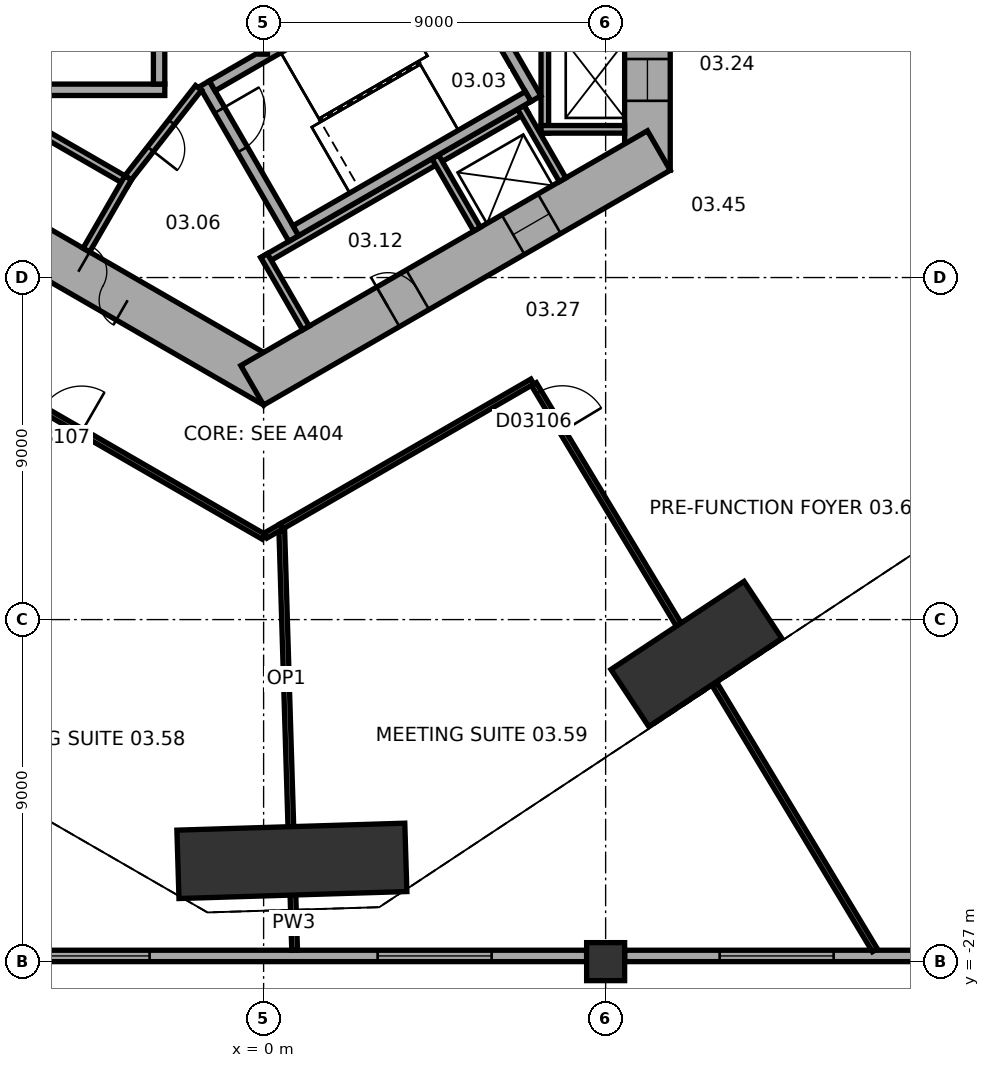
"""IFC4 building model, lengths in metres.
Left out: names, types, materials, properties, quantities, classifications, styles, units other than length and angle.
Written with IfcOpenShell. Run it as: python <this file> out.ifc"""

import sys

from ifc_helpers import new_model, si_unit, direction, frame, frame_2d, origin, origin_2d, place, context, subcontext, project, spatial, rectangle, extrude, element, fill, save


model = new_model("IFC4")
c1 = context("Model", 3, precision=1e-05, world=origin(), true_north=direction((0.0, 1.0)))
c2 = subcontext(c1, "Body", "Model", "MODEL_VIEW")
j1 = project(units=[si_unit("LENGTHUNIT", "METRE"), si_unit("PLANEANGLEUNIT", "RADIAN")], contexts=[c1])
p1 = place(None, origin())
s1 = spatial("IfcSite", under=j1, at=p1, CompositionType="ELEMENT")
p2 = place(p1, origin())
s2 = spatial("IfcBuilding", under=s1, at=p2, CompositionType="ELEMENT")
p3 = place(p2, frame((0.0, 0.0, 21.0)))
s3 = spatial("IfcBuildingStorey", under=s2, at=p3, CompositionType="ELEMENT", Elevation=21.0)
p4 = place(p3, frame((0.744, -24.348, 0.0), z_axis=(0.0, 0.0, 1.0), x_axis=(0.999533484231, 0.03054200224, 0.0)))
e1 = element("IfcColumn", 1, at=p4, inside=s3, PredefinedType="COLUMN", context=c2, shape_type="SweptSolid", body=[
    extrude(rectangle(XDim=6.0, YDim=1.8, at=origin_2d()), origin(), (0.0, 0.0, 1.0), 8.0),
])
p5 = place(p3, frame((11.389, -18.905, 0.0), z_axis=(0.0, 0.0, 1.0), x_axis=(0.833880042151, 0.551945717714, 0.0)))
e2 = element("IfcColumn", 2, at=p5, inside=s3, PredefinedType="COLUMN", context=c2, shape_type="SweptSolid", body=[
    extrude(rectangle(XDim=4.2, YDim=1.8, at=origin_2d()), origin(), (0.0, 0.0, 1.0), 8.0),
])
p6 = place(p3, frame((9.0, -27.0, 0.0), z_axis=(0.0, 0.0, 1.0), x_axis=(1.0, 0.0, 0.0)))
e3 = element("IfcColumn", 3, at=p6, inside=s3, PredefinedType="COLUMN", context=c2, shape_type="SweptSolid", body=[
    extrude(rectangle(XDim=1.0, YDim=1.0, at=origin_2d()), origin(), (0.0, 0.0, 1.0), 8.0),
])
p7 = place(p3, frame((10.1, -6.177, 0.0), z_axis=(0.0, 0.0, 1.0), x_axis=(0.0, 1.0, 0.0)))
e4 = element("IfcWall", 4, at=p7, inside=s3, PredefinedType="SHEAR", context=c2, shape_type="SweptSolid", body=[
    extrude(rectangle(XDim=12.355, YDim=1.2, at=frame_2d((6.177, 0.0))), origin(), (0.0, 0.0, 1.0), 8.0),
])
p8 = place(p7, frame((6.378, 0.0, 0.0)))
e5 = element("IfcOpeningElement", 5, at=p8, cuts=e4, PredefinedType="OPENING", context=c2, shape_type="SweptSolid", body=[
    extrude(rectangle(XDim=1.5, YDim=2.1, at=frame_2d((0.75, 1.05))), frame((0.0, 0.61, 0.0), z_axis=(0.0, -1.0, 0.0), x_axis=(1.0, 0.0, 0.0)), (0.0, 0.0, 1.0), 1.22),
])
p9 = place(p7, frame((1.828, 0.0, 0.0)))
e6 = element("IfcOpeningElement", 6, at=p9, cuts=e4, PredefinedType="OPENING", context=c2, shape_type="SweptSolid", body=[
    extrude(rectangle(XDim=1.1, YDim=2.1, at=frame_2d((0.55, 1.05))), frame((0.0, 0.61, 0.0), z_axis=(0.0, -1.0, 0.0), x_axis=(1.0, 0.0, 0.0)), (0.0, 0.0, 1.0), 1.22),
])
p10 = place(p7, frame((4.427, 0.0, 0.0)))
e7 = element("IfcOpeningElement", 7, at=p10, cuts=e4, PredefinedType="OPENING", context=c2, shape_type="SweptSolid", body=[
    extrude(rectangle(XDim=1.1, YDim=2.1, at=frame_2d((0.55, 1.05))), frame((0.0, 0.61, 0.0), z_axis=(0.0, -1.0, 0.0), x_axis=(1.0, 0.0, 0.0)), (0.0, 0.0, 1.0), 1.22),
])
p11 = place(p3, frame((-10.4, -5.658, 0.0), z_axis=(0.0, 0.0, 1.0), x_axis=(0.866021384402, -0.500006961711, 0.0)))
e8 = element("IfcWall", 8, at=p11, inside=s3, PredefinedType="SHEAR", context=c2, shape_type="SweptSolid", body=[
    extrude(rectangle(XDim=12.355, YDim=1.2, at=frame_2d((6.178, 0.0))), origin(), (0.0, 0.0, 1.0), 8.0),
])
p12 = place(p11, frame((6.378, 0.0, 0.0)))
e9 = element("IfcOpeningElement", 9, at=p12, cuts=e8, PredefinedType="OPENING", context=c2, shape_type="SweptSolid", body=[
    extrude(rectangle(XDim=1.5, YDim=2.1, at=frame_2d((0.75, 1.05))), frame((0.0, 0.61, 0.0), z_axis=(0.0, -1.0, 0.0), x_axis=(1.0, 0.0, 0.0)), (0.0, 0.0, 1.0), 1.22),
])
p13 = place(p11, frame((3.228, 0.0, 0.0)))
e10 = element("IfcOpeningElement", 10, at=p13, cuts=e8, PredefinedType="OPENING", context=c2, shape_type="SweptSolid", body=[
    extrude(rectangle(XDim=0.9, YDim=2.1, at=frame_2d((0.45, 1.05))), frame((0.0, 0.61, 0.0), z_axis=(0.0, -1.0, 0.0), x_axis=(1.0, 0.0, 0.0)), (0.0, 0.0, 1.0), 1.22),
])
p14 = place(p3, frame((-0.3, -11.836, 0.0), z_axis=(0.0, 0.0, 1.0), x_axis=(0.866021384402, 0.500006961711, 0.0)))
e11 = element("IfcWall", 11, at=p14, inside=s3, PredefinedType="SHEAR", context=c2, shape_type="SweptSolid", body=[
    extrude(rectangle(XDim=12.355, YDim=1.2, at=frame_2d((6.178, 0.0))), origin(), (0.0, 0.0, 1.0), 8.0),
])
p15 = place(p14, frame((4.128, 0.0, 0.0)))
e12 = element("IfcOpeningElement", 12, at=p15, cuts=e11, PredefinedType="OPENING", context=c2, shape_type="SweptSolid", body=[
    extrude(rectangle(XDim=0.9, YDim=2.1, at=frame_2d((0.45, 1.05))), frame((0.0, 0.61, 0.0), z_axis=(0.0, -1.0, 0.0), x_axis=(1.0, 0.0, 0.0)), (0.0, 0.0, 1.0), 1.22),
])
p16 = place(p14, frame((7.928, 0.0, 0.0)))
e13 = element("IfcOpeningElement", 13, at=p16, cuts=e11, PredefinedType="OPENING", context=c2, shape_type="SweptSolid", body=[
    extrude(rectangle(XDim=1.1, YDim=2.1, at=frame_2d((0.55, 1.05))), frame((0.0, 0.61, 0.0), z_axis=(0.0, -1.0, 0.0), x_axis=(1.0, 0.0, 0.0)), (0.0, 0.0, 1.0), 1.22),
])
p17 = place(p3, frame((-8.5, -26.85, 0.0), z_axis=(0.0, 0.0, 1.0), x_axis=(1.0, 0.0, 0.0)))
e14 = element("IfcWall", 14, at=p17, inside=s3, PredefinedType="STANDARD", context=c2, shape_type="SweptSolid", body=[
    extrude(rectangle(XDim=17.0, YDim=0.3, at=frame_2d((8.5, 0.0))), origin(), (0.0, 0.0, 1.0), 6.5),
])
p18 = place(p17, frame((2.5, 0.0, 1.0)))
e15 = element("IfcOpeningElement", 15, at=p18, cuts=e14, PredefinedType="OPENING", context=c2, shape_type="SweptSolid", body=[
    extrude(rectangle(XDim=3.0, YDim=4.0, at=frame_2d((1.5, 2.0))), frame((0.0, 0.16, 0.0), z_axis=(0.0, -1.0, 0.0), x_axis=(1.0, 0.0, 0.0)), (0.0, 0.0, 1.0), 0.32),
])
p19 = place(p17, frame((11.5, 0.0, 1.0)))
e16 = element("IfcOpeningElement", 16, at=p19, cuts=e14, PredefinedType="OPENING", context=c2, shape_type="SweptSolid", body=[
    extrude(rectangle(XDim=3.0, YDim=4.0, at=frame_2d((1.5, 2.0))), frame((0.0, 0.16, 0.0), z_axis=(0.0, -1.0, 0.0), x_axis=(1.0, 0.0, 0.0)), (0.0, 0.0, 1.0), 0.32),
])
p20 = place(p3, frame((9.5, -26.85, 0.0), z_axis=(0.0, 0.0, 1.0), x_axis=(1.0, 0.0, 0.0)))
e17 = element("IfcWall", 17, at=p20, inside=s3, PredefinedType="STANDARD", context=c2, shape_type="SweptSolid", body=[
    extrude(rectangle(XDim=17.0, YDim=0.3, at=frame_2d((8.5, 0.0))), origin(), (0.0, 0.0, 1.0), 6.5),
])
p21 = place(p20, frame((2.5, 0.0, 1.0)))
e18 = element("IfcOpeningElement", 18, at=p21, cuts=e17, PredefinedType="OPENING", context=c2, shape_type="SweptSolid", body=[
    extrude(rectangle(XDim=3.0, YDim=4.0, at=frame_2d((1.5, 2.0))), frame((0.0, 0.16, 0.0), z_axis=(0.0, -1.0, 0.0), x_axis=(1.0, 0.0, 0.0)), (0.0, 0.0, 1.0), 0.32),
])
p22 = place(p20, frame((11.5, 0.0, 1.0)))
e19 = element("IfcOpeningElement", 19, at=p22, cuts=e17, PredefinedType="OPENING", context=c2, shape_type="SweptSolid", body=[
    extrude(rectangle(XDim=3.0, YDim=4.0, at=frame_2d((1.5, 2.0))), frame((0.0, 0.16, 0.0), z_axis=(0.0, -1.0, 0.0), x_axis=(1.0, 0.0, 0.0)), (0.0, 0.0, 1.0), 0.32),
])
p23 = place(p3, frame((7.4, -5.2, 0.0), z_axis=(0.0, 0.0, 1.0), x_axis=(0.0, 1.0, 0.0)))
e20 = element("IfcWall", 20, at=p23, inside=s3, PredefinedType="PARTITIONING", context=c2, shape_type="SweptSolid", body=[
    extrude(rectangle(XDim=5.4, YDim=0.2, at=frame_2d((2.7, 0.0))), origin(), (0.0, 0.0, 1.0), 7.7),
])
p24 = place(p3, frame((7.3, -5.1, 0.0), z_axis=(0.0, 0.0, 1.0), x_axis=(1.0, 0.0, 0.0)))
e21 = element("IfcWall", 21, at=p24, inside=s3, PredefinedType="PARTITIONING", context=c2, shape_type="SweptSolid", body=[
    extrude(rectangle(XDim=2.2, YDim=0.2, at=frame_2d((1.1, 0.0))), origin(), (0.0, 0.0, 1.0), 7.7),
])
p25 = place(p3, frame((-8.203, -3.809, 0.0), z_axis=(0.0, 0.0, 1.0), x_axis=(0.866028230842, -0.499995103361, 0.0)))
e22 = element("IfcWall", 22, at=p25, inside=s3, PredefinedType="PARTITIONING", context=c2, shape_type="SweptSolid", body=[
    extrude(rectangle(XDim=5.4, YDim=0.2, at=frame_2d((2.7, 0.0))), origin(), (0.0, 0.0, 1.0), 7.7),
])
p26 = place(p3, frame((-3.563, -6.372, 0.0), z_axis=(0.0, 0.0, 1.0), x_axis=(-0.499994660107, -0.866028486751, 0.0)))
e23 = element("IfcWall", 23, at=p26, inside=s3, PredefinedType="PARTITIONING", context=c2, shape_type="SweptSolid", body=[
    extrude(rectangle(XDim=2.2, YDim=0.2, at=frame_2d((1.1, 0.0))), origin(), (0.0, 0.0, 1.0), 7.7),
])
p27 = place(p3, frame((-0.024, -8.559, 0.0), z_axis=(0.0, 0.0, 1.0), x_axis=(0.866026010844, 0.49999894854, 0.0)))
e24 = element("IfcWall", 24, at=p27, inside=s3, PredefinedType="PARTITIONING", context=c2, shape_type="SweptSolid", body=[
    extrude(rectangle(XDim=8.0, YDim=0.2, at=frame_2d((4.0, 0.0))), origin(), (0.0, 0.0, 1.0), 7.7),
])
for number, where, z_axis, x_axis in (
    (25, (0.013, -8.422, 0.0), (0.0, 0.0, 1.0), (0.5, -0.866, 0.0)),
    (26, (4.516, -5.822, 0.0), (0.0, 0.0, 1.0), (0.5, -0.866, 0.0)),
    (27, (6.768, -4.522, 0.0), (0.0, 0.0, 1.0), (0.5, -0.866, 0.0)),
):
    element("IfcWall", number, at=place(p3, frame(where, z_axis=z_axis, x_axis=x_axis)), inside=s3, PredefinedType="PARTITIONING", context=c2, shape_type="SweptSolid", body=[
        extrude(rectangle(XDim=2.2, YDim=0.2, at=frame_2d((1.1, 0.0))), origin(), (0.0, 0.0, 1.0), 7.7),
    ])
p28 = place(p3, frame((-2.6, -4.06, 0.0), z_axis=(0.0, 0.0, 1.0), x_axis=(-1.0, 0.0, 0.0)))
e28 = element("IfcWall", 28, at=p28, inside=s3, PredefinedType="SHEAR", context=c2, shape_type="SweptSolid", body=[
    extrude(rectangle(XDim=4.7, YDim=0.3, at=frame_2d((2.35, 0.0))), origin(), (0.0, 0.0, 1.0), 7.7),
])
p29 = place(p3, frame((-2.75, 3.15, 0.0), z_axis=(0.0, 0.0, 1.0), x_axis=(0.0, -1.0, 0.0)))
e29 = element("IfcWall", 29, at=p29, inside=s3, PredefinedType="SHEAR", context=c2, shape_type="SweptSolid", body=[
    extrude(rectangle(XDim=7.06, YDim=0.3, at=frame_2d((3.53, 0.0))), origin(), (0.0, 0.0, 1.0), 7.7),
])
p30 = place(p3, frame((-1.558, -3.902, 0.0), z_axis=(0.0, 0.0, 1.0), x_axis=(0.499977259774, -0.866038532462, 0.0)))
e30 = element("IfcWall", 30, at=p30, inside=s3, PredefinedType="SHEAR", context=c2, shape_type="SweptSolid", body=[
    extrude(rectangle(XDim=4.7, YDim=0.3, at=frame_2d((2.35, 0.0))), origin(), (0.0, 0.0, 1.0), 7.7),
])
p31 = place(p30, frame((0.8, 0.0, 0.0)))
e31 = element("IfcOpeningElement", 31, at=p31, cuts=e30, PredefinedType="OPENING", context=c2, shape_type="SweptSolid", body=[
    extrude(rectangle(XDim=1.2, YDim=2.1, at=frame_2d((0.6, 1.05))), frame((0.0, 0.16, 0.0), z_axis=(0.0, -1.0, 0.0), x_axis=(1.0, 0.0, 0.0)), (0.0, 0.0, 1.0), 0.32),
])
p32 = place(p3, frame((4.816, -0.222, 0.0), z_axis=(0.0, 0.0, 1.0), x_axis=(0.499977259774, -0.866038532462, 0.0)))
e32 = element("IfcWall", 32, at=p32, inside=s3, PredefinedType="SHEAR", context=c2, shape_type="SweptSolid", body=[
    extrude(rectangle(XDim=4.7, YDim=0.3, at=frame_2d((2.35, 0.0))), origin(), (0.0, 0.0, 1.0), 7.7),
])
for number, where, z_axis, x_axis in (
    (33, (-1.353, -3.957, 0.0), (0.0, 0.0, 1.0), (0.866, 0.5, 0.0)),
    (34, (0.847, -7.767, 0.0), (0.0, 0.0, 1.0), (0.866, 0.5, 0.0)),
):
    element("IfcWall", number, at=place(p3, frame(where, z_axis=z_axis, x_axis=x_axis)), inside=s3, PredefinedType="SHEAR", context=c2, shape_type="SweptSolid", body=[
        extrude(rectangle(XDim=7.06, YDim=0.3, at=frame_2d((3.53, 0.0))), origin(), (0.0, 0.0, 1.0), 7.7),
    ])
p33 = place(p3, frame((-1.712, -4.008, 0.0), z_axis=(0.0, 0.0, 1.0), x_axis=(-0.616549420702, -0.787316208287, 0.0)))
e35 = element("IfcWall", 35, at=p33, inside=s3, PredefinedType="PARTITIONING", context=c2, shape_type="SweptSolid", body=[
    extrude(rectangle(XDim=3.002, YDim=0.2, at=frame_2d((1.501, 0.0))), origin(), (0.0, 0.0, 1.0), 7.7),
])
p34 = place(p33, frame((1.15, 0.0, 0.0)))
e36 = element("IfcOpeningElement", 36, at=p34, cuts=e35, PredefinedType="OPENING", context=c2, shape_type="SweptSolid", body=[
    extrude(rectangle(XDim=0.9, YDim=2.1, at=frame_2d((0.45, 1.05))), frame((0.0, 0.11, 0.0), z_axis=(0.0, -1.0, 0.0), x_axis=(1.0, 0.0, 0.0)), (0.0, 0.0, 1.0), 0.22),
])
p35 = place(p3, frame((0.0, -3.122, 0.0), z_axis=(0.0, 0.0, 1.0), x_axis=(0.0, 1.0, 0.0)))
e37 = element("IfcWall", 37, at=p35, inside=s3, PredefinedType="PARTITIONING", context=c2, shape_type="SweptSolid", body=[
    extrude(rectangle(XDim=6.245, YDim=0.2, at=frame_2d((3.122, 0.0))), origin(), (0.0, 0.0, 1.0), 7.7),
])
p36 = place(p3, frame((0.771, -25.248, 0.0), z_axis=(0.0, 0.0, 1.0), x_axis=(0.030584206332, -0.99953219374, 0.0)))
e38 = element("IfcWall", 38, at=p36, inside=s3, PredefinedType="PARTITIONING", context=c2, shape_type="SweptSolid", body=[
    extrude(rectangle(XDim=1.453, YDim=0.15, at=frame_2d((0.727, 0.0))), origin(), (0.0, 0.0, 1.0), 7.7),
])
p37 = place(p3, frame((11.879, -19.719, 0.0), z_axis=(0.0, 0.0, 1.0), x_axis=(0.516054476578, -0.856555764212, 0.0)))
e39 = element("IfcWall", 39, at=p37, inside=s3, PredefinedType="PARTITIONING", context=c2, shape_type="SweptSolid", body=[
    extrude(rectangle(XDim=8.149, YDim=0.15, at=frame_2d((4.075, 0.0))), origin(), (0.0, 0.0, 1.0), 7.7),
])
p38 = place(p3, frame((10.924, -18.133, 0.0), z_axis=(0.0, 0.0, 1.0), x_axis=(-0.516035715917, 0.856567066784, 0.0)))
e40 = element("IfcWall", 40, at=p38, inside=s3, PredefinedType="PARTITIONING", context=c2, shape_type="SweptSolid", body=[
    extrude(rectangle(XDim=7.387, YDim=0.15, at=frame_2d((3.693, 0.0))), origin(), (0.0, 0.0, 1.0), 7.7),
])
p39 = place(p38, frame((5.937, 0.0, 0.0)))
e41 = element("IfcOpeningElement", 41, at=p39, cuts=e40, PredefinedType="OPENING", context=c2, shape_type="SweptSolid", body=[
    extrude(rectangle(XDim=1.2, YDim=2.1, at=frame_2d((0.6, 1.05))), frame((0.0, 0.085, 0.0), z_axis=(0.0, -1.0, 0.0), x_axis=(1.0, 0.0, 0.0)), (0.0, 0.0, 1.0), 0.17),
])
p40 = place(p3, frame((0.0, -15.82, 0.0), z_axis=(0.0, 0.0, 1.0), x_axis=(-0.866018019704, 0.500012789385, 0.0)))
e42 = element("IfcWall", 42, at=p40, inside=s3, PredefinedType="PARTITIONING", context=c2, shape_type="SweptSolid", body=[
    extrude(rectangle(XDim=7.327, YDim=0.15, at=frame_2d((3.664, 0.0))), origin(), (0.0, 0.0, 1.0), 7.7),
])
p41 = place(p40, frame((5.527, 0.0, 0.0)))
e43 = element("IfcOpeningElement", 43, at=p41, cuts=e42, PredefinedType="OPENING", context=c2, shape_type="SweptSolid", body=[
    extrude(rectangle(XDim=1.2, YDim=2.1, at=frame_2d((0.6, 1.05))), frame((0.0, 0.085, 0.0), z_axis=(0.0, -1.0, 0.0), x_axis=(1.0, 0.0, 0.0)), (0.0, 0.0, 1.0), 0.17),
])
p42 = place(p3, frame((0.479, -15.665, 0.0), z_axis=(0.0, 0.0, 1.0), x_axis=(0.030535907252, -0.999533670453, 0.0)))
e44 = element("IfcWall", 44, at=p42, inside=s3, PredefinedType="MOVABLE", context=c2, shape_type="SweptSolid", body=[
    extrude(rectangle(XDim=7.787, YDim=0.15, at=frame_2d((3.894, 0.0))), origin(), (0.0, 0.0, 1.0), 7.7),
])
p43 = place(p3, frame((0.475, -15.545, 0.0), z_axis=(0.0, 0.0, 1.0), x_axis=(0.866021168401, 0.500007335828, 0.0)))
e45 = element("IfcWall", 45, at=p43, inside=s3, PredefinedType="PARTITIONING", context=c2, shape_type="SweptSolid", body=[
    extrude(rectangle(XDim=7.616, YDim=0.15, at=frame_2d((3.808, 0.0))), origin(), (0.0, 0.0, 1.0), 7.7),
])
p44 = place(p3, frame((0.475, -15.545, 0.0), z_axis=(0.0, 0.0, 1.0), x_axis=(-0.865927594567, -0.50016937228, 0.0)))
e46 = element("IfcWall", 46, at=p44, inside=s3, PredefinedType="PARTITIONING", context=c2, shape_type="SweptSolid", body=[
    extrude(rectangle(XDim=0.489, YDim=0.15, at=frame_2d((0.244, 0.0))), origin(), (0.0, 0.0, 1.0), 7.7),
])
p45 = place(p18, origin())
e47 = element("IfcWindow", 47, at=p45, inside=s3, PartitioningType="SINGLE_PANEL", PredefinedType="WINDOW", context=c2, shape_type="SweptSolid", body=[
    extrude(rectangle(XDim=3.0, YDim=4.0, at=frame_2d((1.5, 2.0))), frame((0.0, 0.03, 0.0), z_axis=(0.0, -1.0, 0.0), x_axis=(1.0, 0.0, 0.0)), (0.0, 0.0, 1.0), 0.06),
])
fill(e15, e47)
p46 = place(p19, origin())
e48 = element("IfcWindow", 48, at=p46, inside=s3, PartitioningType="SINGLE_PANEL", PredefinedType="WINDOW", context=c2, shape_type="SweptSolid", body=[
    extrude(rectangle(XDim=3.0, YDim=4.0, at=frame_2d((1.5, 2.0))), frame((0.0, 0.03, 0.0), z_axis=(0.0, -1.0, 0.0), x_axis=(1.0, 0.0, 0.0)), (0.0, 0.0, 1.0), 0.06),
])
fill(e16, e48)
p47 = place(p21, origin())
e49 = element("IfcWindow", 49, at=p47, inside=s3, PartitioningType="SINGLE_PANEL", PredefinedType="WINDOW", context=c2, shape_type="SweptSolid", body=[
    extrude(rectangle(XDim=3.0, YDim=4.0, at=frame_2d((1.5, 2.0))), frame((0.0, 0.03, 0.0), z_axis=(0.0, -1.0, 0.0), x_axis=(1.0, 0.0, 0.0)), (0.0, 0.0, 1.0), 0.06),
])
fill(e18, e49)
p48 = place(p12, origin())
e50 = element("IfcDoor", 50, at=p48, inside=s3, OperationType="DOUBLE_DOOR_SINGLE_SWING", PredefinedType="DOOR", context=c2, shape_type="SweptSolid", body=[
    extrude(rectangle(XDim=1.5, YDim=2.1, at=frame_2d((0.75, 1.05))), frame((0.0, 0.025, 0.0), z_axis=(0.0, -1.0, 0.0), x_axis=(1.0, 0.0, 0.0)), (0.0, 0.0, 1.0), 0.05),
])
fill(e9, e50)
p49 = place(p31, origin())
e51 = element("IfcDoor", 51, at=p49, inside=s3, OperationType="SINGLE_SWING_RIGHT", PredefinedType="DOOR", context=c2, shape_type="SweptSolid", body=[
    extrude(rectangle(XDim=1.2, YDim=2.1, at=frame_2d((0.6, 1.05))), frame((0.0, 0.025, 0.0), z_axis=(0.0, -1.0, 0.0), x_axis=(1.0, 0.0, 0.0)), (0.0, 0.0, 1.0), 0.05),
])
fill(e31, e51)
p50 = place(p34, origin())
e52 = element("IfcDoor", 52, at=p50, inside=s3, OperationType="SINGLE_SWING_LEFT", PredefinedType="DOOR", context=c2, shape_type="SweptSolid", body=[
    extrude(rectangle(XDim=0.9, YDim=2.1, at=frame_2d((0.45, 1.05))), frame((0.0, 0.025, 0.0), z_axis=(0.0, -1.0, 0.0), x_axis=(1.0, 0.0, 0.0)), (0.0, 0.0, 1.0), 0.05),
])
fill(e36, e52)
p51 = place(p15, origin())
e53 = element("IfcDoor", 53, at=p51, inside=s3, OperationType="SINGLE_SWING_LEFT", PredefinedType="DOOR", context=c2, shape_type="SweptSolid", body=[
    extrude(rectangle(XDim=0.9, YDim=2.1, at=frame_2d((0.45, 1.05))), frame((0.0, 0.025, 0.0), z_axis=(0.0, -1.0, 0.0), x_axis=(1.0, 0.0, 0.0)), (0.0, 0.0, 1.0), 0.05),
])
fill(e12, e53)
p52 = place(p9, origin())
e54 = element("IfcDoor", 54, at=p52, inside=s3, OperationType="DOUBLE_DOOR_SLIDING", PredefinedType="DOOR", context=c2, shape_type="SweptSolid", body=[
    extrude(rectangle(XDim=1.1, YDim=2.1, at=frame_2d((0.55, 1.05))), frame((0.0, 0.025, 0.0), z_axis=(0.0, -1.0, 0.0), x_axis=(1.0, 0.0, 0.0)), (0.0, 0.0, 1.0), 0.05),
])
fill(e6, e54)
p53 = place(p16, origin())
e55 = element("IfcDoor", 55, at=p53, inside=s3, OperationType="DOUBLE_DOOR_SLIDING", PredefinedType="DOOR", context=c2, shape_type="SweptSolid", body=[
    extrude(rectangle(XDim=1.1, YDim=2.1, at=frame_2d((0.55, 1.05))), frame((0.0, 0.025, 0.0), z_axis=(0.0, -1.0, 0.0), x_axis=(1.0, 0.0, 0.0)), (0.0, 0.0, 1.0), 0.05),
])
fill(e13, e55)
p54 = place(p39, origin())
e56 = element("IfcDoor", 56, at=p54, inside=s3, OperationType="SINGLE_SWING_LEFT", PredefinedType="DOOR", context=c2, shape_type="SweptSolid", body=[
    extrude(rectangle(XDim=1.2, YDim=2.1, at=frame_2d((0.6, 1.05))), frame((0.0, 0.025, 0.0), z_axis=(0.0, -1.0, 0.0), x_axis=(1.0, 0.0, 0.0)), (0.0, 0.0, 1.0), 0.05),
])
fill(e41, e56)
p55 = place(p41, origin())
e57 = element("IfcDoor", 57, at=p55, inside=s3, OperationType="SINGLE_SWING_LEFT", PredefinedType="DOOR", context=c2, shape_type="SweptSolid", body=[
    extrude(rectangle(XDim=1.2, YDim=2.1, at=frame_2d((0.6, 1.05))), frame((0.0, 0.025, 0.0), z_axis=(0.0, -1.0, 0.0), x_axis=(1.0, 0.0, 0.0)), (0.0, 0.0, 1.0), 0.05),
])
fill(e43, e57)
save(model, sys.argv[1])
